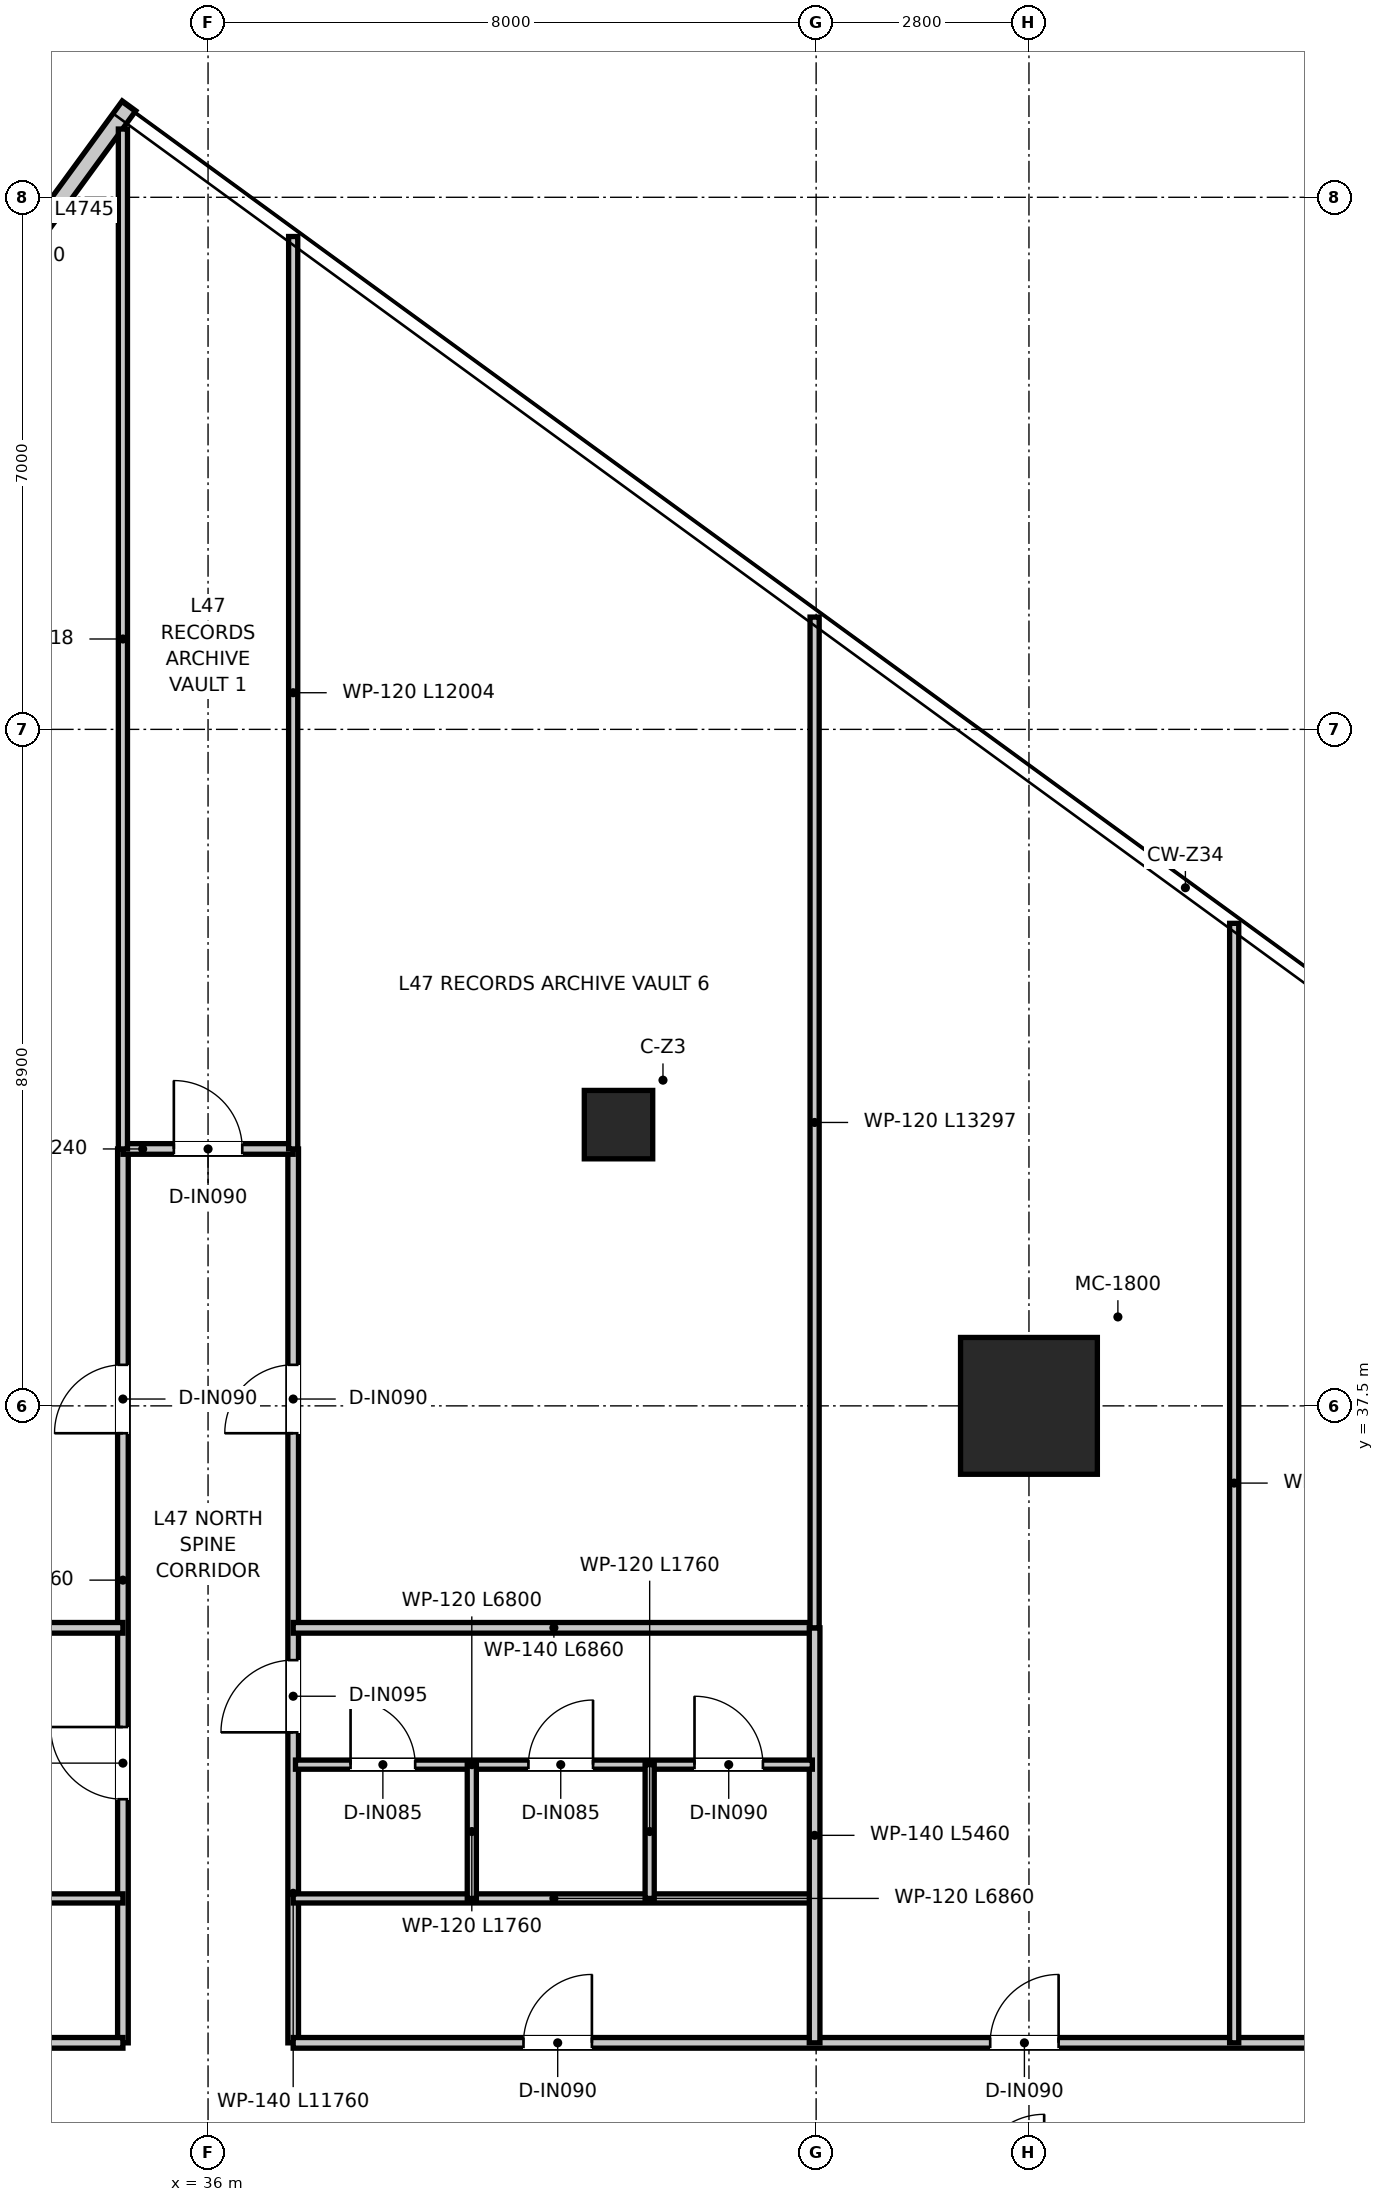
"""IFC4 building model, lengths in metres.
Left out: names, types, materials, properties, quantities, classifications, styles, units other than length and angle.
Written with IfcOpenShell. Run it as: python <this file> out.ifc"""

import sys

from ifc_helpers import new_model, si_unit, direction, frame, frame_2d, origin, origin_2d, place, context, subcontext, project, spatial, rectangle, extrude, source, transform, mapped, element, fill, save


model = new_model("IFC4")
c1 = context("Model", 3, precision=1e-05, world=origin(), true_north=direction((0.0, 1.0)))
c2 = subcontext(c1, "Body", "Model", "MODEL_VIEW")
j1 = project(units=[si_unit("LENGTHUNIT", "METRE"), si_unit("PLANEANGLEUNIT", "RADIAN")], contexts=[c1])
p1 = place(None, origin())
s1 = spatial("IfcSite", under=j1, at=p1, CompositionType="ELEMENT")
p2 = place(p1, origin())
s2 = spatial("IfcBuilding", under=s1, at=p2, CompositionType="ELEMENT")
p3 = place(p2, frame((0.0, 0.0, 193.6)))
s3 = spatial("IfcBuildingStorey", under=s2, at=p3, CompositionType="ELEMENT", Elevation=193.6)
m1 = source(origin(), c2, "Body", "SweptSolid", [
    extrude(rectangle(XDim=1.8, YDim=1.8, at=origin_2d()), origin(), (0.0, 0.0, 1.0), 3.95),
])
p4 = place(p3, frame((46.8, 37.5, 0.0), z_axis=(0.0, 0.0, 1.0), x_axis=(1.0, 0.0, 0.0)))
e1 = element("IfcColumn", 1, at=p4, inside=s3, PredefinedType="USERDEFINED", context=c2, shape_type="MappedRepresentation", body=[
    mapped(m1, transform((0.0, 0.0, 0.0), x_axis=(1.0, 0.0, 0.0), y_axis=(0.0, 1.0, 0.0), z_axis=(0.0, 0.0, 1.0), scale=1.0)),
])
m2 = source(origin(), c2, "Body", "SweptSolid", [
    extrude(rectangle(XDim=0.9, YDim=0.9, at=origin_2d()), origin(), (0.0, 0.0, 1.0), 3.95),
])
p5 = place(p3, frame((41.4, 41.2, 0.0), z_axis=(0.0, 0.0, 1.0), x_axis=(1.0, 0.0, 0.0)))
e2 = element("IfcColumn", 2, at=p5, inside=s3, PredefinedType="COLUMN", context=c2, shape_type="MappedRepresentation", body=[
    mapped(m2, transform((0.0, 0.0, 0.0), x_axis=(1.0, 0.0, 0.0), y_axis=(0.0, 1.0, 0.0), z_axis=(0.0, 0.0, 1.0), scale=1.0)),
])
p6 = place(p3, frame((34.96, 54.603, 0.0), z_axis=(0.0, 0.0, 1.0), x_axis=(-0.589559809791, -0.807724724568, 0.0)))
e3 = element("IfcWall", 3, at=p6, inside=s3, PredefinedType="ELEMENTEDWALL", context=c2, shape_type="SweptSolid", body=[
    extrude(rectangle(XDim=4.745, YDim=0.22, at=frame_2d((2.373, 0.0))), origin(), (0.0, 0.0, 1.0), 3.67),
])
p7 = place(p3, frame((34.88, 29.12, 0.0), z_axis=(0.0, 0.0, 1.0), x_axis=(0.0, 1.0, 0.0)))
e4 = element("IfcWall", 4, at=p7, inside=s3, PredefinedType="PARTITIONING", context=c2, shape_type="SweptSolid", body=[
    extrude(rectangle(XDim=11.76, YDim=0.14, at=frame_2d((5.88, 0.0))), origin(), (0.0, 0.0, 1.0), 3.03),
])
p8 = place(p7, frame((3.205, 0.0, 0.0)))
e5 = element("IfcOpeningElement", 5, at=p8, cuts=e4, PredefinedType="OPENING", context=c2, shape_type="SweptSolid", body=[
    extrude(rectangle(XDim=0.95, YDim=2.1, at=frame_2d((0.475, 1.05))), frame((0.0, 0.08, 0.0), z_axis=(0.0, -1.0, 0.0), x_axis=(1.0, 0.0, 0.0)), (0.0, 0.0, 1.0), 0.16),
])
p9 = place(p7, frame((8.02, 0.0, 0.0)))
e6 = element("IfcOpeningElement", 6, at=p9, cuts=e4, PredefinedType="OPENING", context=c2, shape_type="SweptSolid", body=[
    extrude(rectangle(XDim=0.9, YDim=2.1, at=frame_2d((0.45, 1.05))), frame((0.0, 0.08, 0.0), z_axis=(0.0, -1.0, 0.0), x_axis=(1.0, 0.0, 0.0)), (0.0, 0.0, 1.0), 0.16),
])
p10 = place(p3, frame((37.12, 29.12, 0.0), z_axis=(0.0, 0.0, 1.0), x_axis=(0.0, 1.0, 0.0)))
e7 = element("IfcWall", 7, at=p10, inside=s3, PredefinedType="PARTITIONING", context=c2, shape_type="SweptSolid", body=[
    extrude(rectangle(XDim=11.76, YDim=0.14, at=frame_2d((5.88, 0.0))), origin(), (0.0, 0.0, 1.0), 3.03),
])
p11 = place(p10, frame((4.085, 0.0, 0.0)))
e8 = element("IfcOpeningElement", 8, at=p11, cuts=e7, PredefinedType="OPENING", context=c2, shape_type="SweptSolid", body=[
    extrude(rectangle(XDim=0.95, YDim=2.1, at=frame_2d((0.475, 1.05))), frame((0.0, 0.08, 0.0), z_axis=(0.0, -1.0, 0.0), x_axis=(1.0, 0.0, 0.0)), (0.0, 0.0, 1.0), 0.16),
])
p12 = place(p10, frame((8.02, 0.0, 0.0)))
e9 = element("IfcOpeningElement", 9, at=p12, cuts=e7, PredefinedType="OPENING", context=c2, shape_type="SweptSolid", body=[
    extrude(rectangle(XDim=0.9, YDim=2.1, at=frame_2d((0.45, 1.05))), frame((0.0, 0.08, 0.0), z_axis=(0.0, -1.0, 0.0), x_axis=(1.0, 0.0, 0.0)), (0.0, 0.0, 1.0), 0.16),
])
p13 = place(p3, frame((34.88, 40.88, 0.0), z_axis=(0.0, 0.0, 1.0), x_axis=(1.0, 0.0, 0.0)))
e10 = element("IfcWall", 10, at=p13, inside=s3, PredefinedType="PARTITIONING", context=c2, shape_type="SweptSolid", body=[
    extrude(rectangle(XDim=2.24, YDim=0.14, at=frame_2d((1.12, 0.0))), origin(), (0.0, 0.0, 1.0), 3.67),
])
p14 = place(p13, frame((0.67, 0.0, 0.0)))
e11 = element("IfcOpeningElement", 11, at=p14, cuts=e10, PredefinedType="OPENING", context=c2, shape_type="SweptSolid", body=[
    extrude(rectangle(XDim=0.9, YDim=2.1, at=frame_2d((0.45, 1.05))), frame((0.0, 0.08, 0.0), z_axis=(0.0, -1.0, 0.0), x_axis=(1.0, 0.0, 0.0)), (0.0, 0.0, 1.0), 0.16),
])
p15 = place(p3, frame((10.765, 29.12, 0.0), z_axis=(0.0, 0.0, 1.0), x_axis=(1.0, 0.0, 0.0)))
e12 = element("IfcWall", 12, at=p15, inside=s3, PredefinedType="PARTITIONING", context=c2, shape_type="SweptSolid", body=[
    extrude(rectangle(XDim=24.115, YDim=0.14, at=frame_2d((12.058, 0.0))), origin(), (0.0, 0.0, 1.0), 3.03),
])
p16 = place(p15, frame((20.185, 0.0, 0.0)))
e13 = element("IfcOpeningElement", 13, at=p16, cuts=e12, PredefinedType="OPENING", context=c2, shape_type="SweptSolid", body=[
    extrude(rectangle(XDim=0.9, YDim=2.1, at=frame_2d((0.45, 1.05))), frame((0.0, 0.08, 0.0), z_axis=(0.0, -1.0, 0.0), x_axis=(1.0, 0.0, 0.0)), (0.0, 0.0, 1.0), 0.16),
])
p17 = place(p15, frame((4.115, 0.0, 0.0)))
e14 = element("IfcOpeningElement", 14, at=p17, cuts=e12, PredefinedType="OPENING", context=c2, shape_type="SweptSolid", body=[
    extrude(rectangle(XDim=0.9, YDim=2.1, at=frame_2d((0.45, 1.05))), frame((0.0, 0.08, 0.0), z_axis=(0.0, -1.0, 0.0), x_axis=(1.0, 0.0, 0.0)), (0.0, 0.0, 1.0), 0.16),
])
p18 = place(p15, frame((11.935, 0.0, 0.0)))
e15 = element("IfcOpeningElement", 15, at=p18, cuts=e12, PredefinedType="OPENING", context=c2, shape_type="SweptSolid", body=[
    extrude(rectangle(XDim=0.9, YDim=2.1, at=frame_2d((0.45, 1.05))), frame((0.0, 0.08, 0.0), z_axis=(0.0, -1.0, 0.0), x_axis=(1.0, 0.0, 0.0)), (0.0, 0.0, 1.0), 0.16),
])
p19 = place(p15, frame((14.985, 0.0, 0.0)))
e16 = element("IfcOpeningElement", 16, at=p19, cuts=e12, PredefinedType="OPENING", context=c2, shape_type="SweptSolid", body=[
    extrude(rectangle(XDim=0.9, YDim=2.1, at=frame_2d((0.45, 1.05))), frame((0.0, 0.08, 0.0), z_axis=(0.0, -1.0, 0.0), x_axis=(1.0, 0.0, 0.0)), (0.0, 0.0, 1.0), 0.16),
])
p20 = place(p3, frame((37.12, 29.12, 0.0), z_axis=(0.0, 0.0, 1.0), x_axis=(1.0, 0.0, 0.0)))
e17 = element("IfcWall", 17, at=p20, inside=s3, PredefinedType="PARTITIONING", context=c2, shape_type="SweptSolid", body=[
    extrude(rectangle(XDim=24.697, YDim=0.14, at=frame_2d((12.348, 0.0))), origin(), (0.0, 0.0, 1.0), 3.03),
])
p21 = place(p20, frame((3.03, 0.0, 0.0)))
e18 = element("IfcOpeningElement", 18, at=p21, cuts=e17, PredefinedType="OPENING", context=c2, shape_type="SweptSolid", body=[
    extrude(rectangle(XDim=0.9, YDim=2.1, at=frame_2d((0.45, 1.05))), frame((0.0, 0.08, 0.0), z_axis=(0.0, -1.0, 0.0), x_axis=(1.0, 0.0, 0.0)), (0.0, 0.0, 1.0), 0.16),
])
p22 = place(p20, frame((9.17, 0.0, 0.0)))
e19 = element("IfcOpeningElement", 19, at=p22, cuts=e17, PredefinedType="OPENING", context=c2, shape_type="SweptSolid", body=[
    extrude(rectangle(XDim=0.9, YDim=2.1, at=frame_2d((0.45, 1.05))), frame((0.0, 0.08, 0.0), z_axis=(0.0, -1.0, 0.0), x_axis=(1.0, 0.0, 0.0)), (0.0, 0.0, 1.0), 0.16),
])
p23 = place(p20, frame((18.6, 0.0, 0.0)))
e20 = element("IfcOpeningElement", 20, at=p23, cuts=e17, PredefinedType="OPENING", context=c2, shape_type="SweptSolid", body=[
    extrude(rectangle(XDim=0.9, YDim=2.1, at=frame_2d((0.45, 1.05))), frame((0.0, 0.08, 0.0), z_axis=(0.0, -1.0, 0.0), x_axis=(1.0, 0.0, 0.0)), (0.0, 0.0, 1.0), 0.16),
])
for number, where, z_axis, x_axis in (
    (21, (28.02, 31.02, 0.0), (0.0, 0.0, 1.0), (1.0, 0.0, 0.0)),
    (22, (37.12, 31.02, 0.0), (0.0, 0.0, 1.0), (1.0, 0.0, 0.0)),
):
    element("IfcWall", number, at=place(p3, frame(where, z_axis=z_axis, x_axis=x_axis)), inside=s3, PredefinedType="PARTITIONING", context=c2, shape_type="SweptSolid", body=[
        extrude(rectangle(XDim=6.86, YDim=0.12, at=frame_2d((3.43, 0.0))), origin(), (0.0, 0.0, 1.0), 3.08),
    ])
for number, where, z_axis, x_axis in (
    (23, (28.02, 34.58, 0.0), (0.0, 0.0, 1.0), (1.0, 0.0, 0.0)),
    (24, (37.12, 34.58, 0.0), (0.0, 0.0, 1.0), (1.0, 0.0, 0.0)),
):
    element("IfcWall", number, at=place(p3, frame(where, z_axis=z_axis, x_axis=x_axis)), inside=s3, PredefinedType="PARTITIONING", context=c2, shape_type="SweptSolid", body=[
        extrude(rectangle(XDim=6.86, YDim=0.14, at=frame_2d((3.43, 0.0))), origin(), (0.0, 0.0, 1.0), 3.08),
    ])
p24 = place(p3, frame((43.98, 29.12, 0.0), z_axis=(0.0, 0.0, 1.0), x_axis=(0.0, 1.0, 0.0)))
e25 = element("IfcWall", 25, at=p24, inside=s3, PredefinedType="PARTITIONING", context=c2, shape_type="SweptSolid", body=[
    extrude(rectangle(XDim=5.46, YDim=0.14, at=frame_2d((2.73, 0.0))), origin(), (0.0, 0.0, 1.0), 3.31),
])
p25 = place(p3, frame((37.15, 32.78, 0.0), z_axis=(0.0, 0.0, 1.0), x_axis=(1.0, 0.0, 0.0)))
e26 = element("IfcWall", 26, at=p25, inside=s3, PredefinedType="PARTITIONING", context=c2, shape_type="SweptSolid", body=[
    extrude(rectangle(XDim=6.8, YDim=0.12, at=frame_2d((3.4, 0.0))), origin(), (0.0, 0.0, 1.0), 3.08),
])
p26 = place(p25, frame((0.725, 0.0, 0.0)))
e27 = element("IfcOpeningElement", 27, at=p26, cuts=e26, PredefinedType="OPENING", context=c2, shape_type="SweptSolid", body=[
    extrude(rectangle(XDim=0.85, YDim=2.1, at=frame_2d((0.425, 1.05))), frame((0.0, 0.07, 0.0), z_axis=(0.0, -1.0, 0.0), x_axis=(1.0, 0.0, 0.0)), (0.0, 0.0, 1.0), 0.14),
])
p27 = place(p25, frame((3.065, 0.0, 0.0)))
e28 = element("IfcOpeningElement", 28, at=p27, cuts=e26, PredefinedType="OPENING", context=c2, shape_type="SweptSolid", body=[
    extrude(rectangle(XDim=0.85, YDim=2.1, at=frame_2d((0.425, 1.05))), frame((0.0, 0.07, 0.0), z_axis=(0.0, -1.0, 0.0), x_axis=(1.0, 0.0, 0.0)), (0.0, 0.0, 1.0), 0.14),
])
p28 = place(p25, frame((5.25, 0.0, 0.0)))
e29 = element("IfcOpeningElement", 29, at=p28, cuts=e26, PredefinedType="OPENING", context=c2, shape_type="SweptSolid", body=[
    extrude(rectangle(XDim=0.9, YDim=2.1, at=frame_2d((0.45, 1.05))), frame((0.0, 0.07, 0.0), z_axis=(0.0, -1.0, 0.0), x_axis=(1.0, 0.0, 0.0)), (0.0, 0.0, 1.0), 0.14),
])
for number, where, z_axis, x_axis in (
    (30, (39.47, 31.02, 0.0), (0.0, 0.0, 1.0), (0.0, 1.0, 0.0)),
    (31, (41.81, 31.02, 0.0), (0.0, 0.0, 1.0), (0.0, 1.0, 0.0)),
):
    element("IfcWall", number, at=place(p3, frame(where, z_axis=z_axis, x_axis=x_axis)), inside=s3, PredefinedType="PARTITIONING", context=c2, shape_type="SweptSolid", body=[
        extrude(rectangle(XDim=1.76, YDim=0.12, at=frame_2d((0.88, 0.0))), origin(), (0.0, 0.0, 1.0), 3.67),
    ])
p29 = place(p3, frame((34.88, 40.88, 0.0), z_axis=(0.0, 0.0, 1.0), x_axis=(0.0, 1.0, 0.0)))
e32 = element("IfcWall", 32, at=p29, inside=s3, PredefinedType="PARTITIONING", context=c2, shape_type="SweptSolid", body=[
    extrude(rectangle(XDim=13.418, YDim=0.12, at=frame_2d((6.709, 0.0))), origin(), (0.0, 0.0, 1.0), 3.28),
])
p30 = place(p3, frame((37.12, 40.88, 0.0), z_axis=(0.0, 0.0, 1.0), x_axis=(0.0, 1.0, 0.0)))
e33 = element("IfcWall", 33, at=p30, inside=s3, PredefinedType="PARTITIONING", context=c2, shape_type="SweptSolid", body=[
    extrude(rectangle(XDim=12.004, YDim=0.12, at=frame_2d((6.002, 0.0))), origin(), (0.0, 0.0, 1.0), 3.28),
])
p31 = place(p3, frame((43.98, 34.58, 0.0), z_axis=(0.0, 0.0, 1.0), x_axis=(0.0, 1.0, 0.0)))
e34 = element("IfcWall", 34, at=p31, inside=s3, PredefinedType="PARTITIONING", context=c2, shape_type="SweptSolid", body=[
    extrude(rectangle(XDim=13.297, YDim=0.12, at=frame_2d((6.648, 0.0))), origin(), (0.0, 0.0, 1.0), 3.03),
])
p32 = place(p3, frame((49.5, 29.12, 0.0), z_axis=(0.0, 0.0, 1.0), x_axis=(0.0, 1.0, 0.0)))
e35 = element("IfcWall", 35, at=p32, inside=s3, PredefinedType="PARTITIONING", context=c2, shape_type="SweptSolid", body=[
    extrude(rectangle(XDim=14.728, YDim=0.12, at=frame_2d((7.364, 0.0))), origin(), (0.0, 0.0, 1.0), 3.08),
])
p33 = place(p21, origin())
e36 = element("IfcDoor", 36, at=p33, inside=s3, OperationType="SINGLE_SWING_RIGHT", PredefinedType="DOOR", context=c2, shape_type="SweptSolid", body=[
    extrude(rectangle(XDim=0.9, YDim=2.1, at=frame_2d((0.45, 1.05))), frame((0.0, 0.025, 0.0), z_axis=(0.0, -1.0, 0.0), x_axis=(1.0, 0.0, 0.0)), (0.0, 0.0, 1.0), 0.05),
])
fill(e18, e36)
p34 = place(p11, origin())
e37 = element("IfcDoor", 37, at=p34, inside=s3, OperationType="SINGLE_SWING_LEFT", PredefinedType="DOOR", context=c2, shape_type="SweptSolid", body=[
    extrude(rectangle(XDim=0.95, YDim=2.1, at=frame_2d((0.475, 1.05))), frame((0.0, 0.025, 0.0), z_axis=(0.0, -1.0, 0.0), x_axis=(1.0, 0.0, 0.0)), (0.0, 0.0, 1.0), 0.05),
])
fill(e8, e37)
p35 = place(p8, origin())
e38 = element("IfcDoor", 38, at=p35, inside=s3, OperationType="SINGLE_SWING_RIGHT", PredefinedType="DOOR", context=c2, shape_type="SweptSolid", body=[
    extrude(rectangle(XDim=0.95, YDim=2.1, at=frame_2d((0.475, 1.05))), frame((0.0, 0.025, 0.0), z_axis=(0.0, -1.0, 0.0), x_axis=(1.0, 0.0, 0.0)), (0.0, 0.0, 1.0), 0.05),
])
fill(e5, e38)
p36 = place(p26, origin())
e39 = element("IfcDoor", 39, at=p36, inside=s3, OperationType="SINGLE_SWING_LEFT", PredefinedType="DOOR", context=c2, shape_type="SweptSolid", body=[
    extrude(rectangle(XDim=0.85, YDim=2.1, at=frame_2d((0.425, 1.05))), frame((0.0, 0.025, 0.0), z_axis=(0.0, -1.0, 0.0), x_axis=(1.0, 0.0, 0.0)), (0.0, 0.0, 1.0), 0.05),
])
fill(e27, e39)
p37 = place(p27, origin())
e40 = element("IfcDoor", 40, at=p37, inside=s3, OperationType="SINGLE_SWING_RIGHT", PredefinedType="DOOR", context=c2, shape_type="SweptSolid", body=[
    extrude(rectangle(XDim=0.85, YDim=2.1, at=frame_2d((0.425, 1.05))), frame((0.0, 0.025, 0.0), z_axis=(0.0, -1.0, 0.0), x_axis=(1.0, 0.0, 0.0)), (0.0, 0.0, 1.0), 0.05),
])
fill(e28, e40)
p38 = place(p28, origin())
e41 = element("IfcDoor", 41, at=p38, inside=s3, OperationType="SINGLE_SWING_LEFT", PredefinedType="DOOR", context=c2, shape_type="SweptSolid", body=[
    extrude(rectangle(XDim=0.9, YDim=2.1, at=frame_2d((0.45, 1.05))), frame((0.0, 0.025, 0.0), z_axis=(0.0, -1.0, 0.0), x_axis=(1.0, 0.0, 0.0)), (0.0, 0.0, 1.0), 0.05),
])
fill(e29, e41)
p39 = place(p14, origin())
e42 = element("IfcDoor", 42, at=p39, inside=s3, OperationType="SINGLE_SWING_LEFT", PredefinedType="DOOR", context=c2, shape_type="SweptSolid", body=[
    extrude(rectangle(XDim=0.9, YDim=2.1, at=frame_2d((0.45, 1.05))), frame((0.0, 0.025, 0.0), z_axis=(0.0, -1.0, 0.0), x_axis=(1.0, 0.0, 0.0)), (0.0, 0.0, 1.0), 0.05),
])
fill(e11, e42)
p40 = place(p9, origin())
e43 = element("IfcDoor", 43, at=p40, inside=s3, OperationType="SINGLE_SWING_LEFT", PredefinedType="DOOR", context=c2, shape_type="SweptSolid", body=[
    extrude(rectangle(XDim=0.9, YDim=2.1, at=frame_2d((0.45, 1.05))), frame((0.0, 0.025, 0.0), z_axis=(0.0, -1.0, 0.0), x_axis=(1.0, 0.0, 0.0)), (0.0, 0.0, 1.0), 0.05),
])
fill(e6, e43)
p41 = place(p12, origin())
e44 = element("IfcDoor", 44, at=p41, inside=s3, OperationType="SINGLE_SWING_LEFT", PredefinedType="DOOR", context=c2, shape_type="SweptSolid", body=[
    extrude(rectangle(XDim=0.9, YDim=2.1, at=frame_2d((0.45, 1.05))), frame((0.0, 0.025, 0.0), z_axis=(0.0, -1.0, 0.0), x_axis=(1.0, 0.0, 0.0)), (0.0, 0.0, 1.0), 0.05),
])
fill(e9, e44)
p42 = place(p22, origin())
e45 = element("IfcDoor", 45, at=p42, inside=s3, OperationType="SINGLE_SWING_RIGHT", PredefinedType="DOOR", context=c2, shape_type="SweptSolid", body=[
    extrude(rectangle(XDim=0.9, YDim=2.1, at=frame_2d((0.45, 1.05))), frame((0.0, 0.025, 0.0), z_axis=(0.0, -1.0, 0.0), x_axis=(1.0, 0.0, 0.0)), (0.0, 0.0, 1.0), 0.05),
])
fill(e19, e45)
save(model, sys.argv[1])
